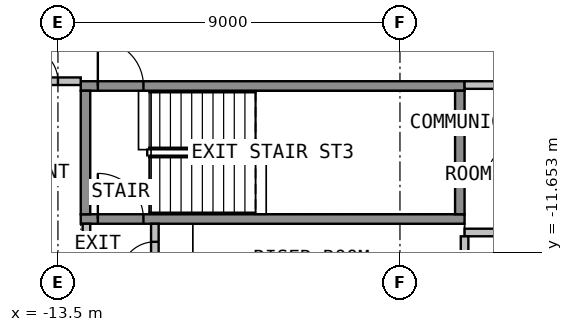
"""IFC4 building model, lengths in metres.
Left out: names, types, materials, properties, quantities, classifications, styles, units other than length and angle.
Written with IfcOpenShell. Run it as: python <this file> out.ifc"""

import sys

from ifc_helpers import new_model, si_unit, direction, frame, frame_2d, origin, place, context, subcontext, project, spatial, rectangle, extrude, element, fill, save


model = new_model("IFC4")
c1 = context("Model", 3, precision=1e-05, world=origin(), true_north=direction((0.0, 1.0)))
c2 = subcontext(c1, "Body", "Model", "MODEL_VIEW")
j1 = project(units=[si_unit("LENGTHUNIT", "METRE"), si_unit("PLANEANGLEUNIT", "RADIAN")], contexts=[c1])
p1 = place(None, origin())
s1 = spatial("IfcSite", under=j1, at=p1, CompositionType="ELEMENT")
p2 = place(p1, origin())
s2 = spatial("IfcBuilding", under=s1, at=p2, CompositionType="ELEMENT")
p3 = place(p2, frame((0.0, 0.0, 132.6)))
s3 = spatial("IfcBuildingStorey", under=s2, at=p3, CompositionType="ELEMENT", Elevation=132.6)
p4 = place(p3, frame((-12.9, -10.775, 0.0), z_axis=(0.0, 0.0, 1.0), x_axis=(1.0, 0.0, 0.0)))
e1 = element("IfcWall", 1, at=p4, inside=s3, PredefinedType="SHEAR", context=c2, shape_type="SweptSolid", body=[
    extrude(rectangle(XDim=10.1, YDim=0.25, at=frame_2d((5.05, 0.0))), origin(), (0.0, 0.0, 1.0), 3.575),
])
p5 = place(p4, frame((0.45, 0.0, 0.0)))
e2 = element("IfcOpeningElement", 2, at=p5, cuts=e1, PredefinedType="OPENING", context=c2, shape_type="SweptSolid", body=[
    extrude(rectangle(XDim=1.2, YDim=2.1, at=frame_2d((0.6, 1.05))), frame((0.0, 0.135, 0.0), z_axis=(0.0, -1.0, 0.0), x_axis=(1.0, 0.0, 0.0)), (0.0, 0.0, 1.0), 0.27),
])
p6 = place(p3, frame((-12.9, -7.275, 0.0), z_axis=(0.0, 0.0, 1.0), x_axis=(1.0, 0.0, 0.0)))
e3 = element("IfcWall", 3, at=p6, inside=s3, PredefinedType="SHEAR", context=c2, shape_type="SweptSolid", body=[
    extrude(rectangle(XDim=10.1, YDim=0.25, at=frame_2d((5.05, 0.0))), origin(), (0.0, 0.0, 1.0), 3.575),
])
p7 = place(p6, frame((0.45, 0.0, 0.0)))
e4 = element("IfcOpeningElement", 4, at=p7, cuts=e3, PredefinedType="OPENING", context=c2, shape_type="SweptSolid", body=[
    extrude(rectangle(XDim=1.2, YDim=2.1, at=frame_2d((0.6, 1.05))), frame((0.0, 0.135, 0.0), z_axis=(0.0, -1.0, 0.0), x_axis=(1.0, 0.0, 0.0)), (0.0, 0.0, 1.0), 0.27),
])
for number, where, z_axis, x_axis in (
    (5, (-12.775, -10.65, 0.0), (0.0, 0.0, 1.0), (0.0, 1.0, 0.0)),
    (6, (-2.925, -10.65, 0.0), (0.0, 0.0, 1.0), (0.0, 1.0, 0.0)),
):
    element("IfcWall", number, at=place(p3, frame(where, z_axis=z_axis, x_axis=x_axis)), inside=s3, PredefinedType="SHEAR", context=c2, shape_type="SweptSolid", body=[
        extrude(rectangle(XDim=3.25, YDim=0.25, at=frame_2d((1.625, 0.0))), origin(), (0.0, 0.0, 1.0), 3.575),
    ])
for number, where, z_axis, x_axis in (
    (7, (-2.8, -7.25, 0.0), (0.0, 0.0, 1.0), (1.0, 0.0, 0.0)),
    (8, (-2.8, -11.13, 0.0), (0.0, 0.0, 1.0), (1.0, 0.0, 0.0)),
):
    element("IfcWall", number, at=place(p3, frame(where, z_axis=z_axis, x_axis=x_axis)), inside=s3, PredefinedType="PARTITIONING", context=c2, shape_type="SweptSolid", body=[
        extrude(rectangle(XDim=1.4, YDim=0.2, at=frame_2d((0.7, 0.0))), origin(), (0.0, 0.0, 1.0), 3.575),
    ])
p8 = place(p3, frame((-12.75, -12.75, 0.0), z_axis=(0.0, 0.0, 1.0), x_axis=(0.0, 1.0, 0.0)))
e9 = element("IfcWall", 9, at=p8, inside=s3, PredefinedType="PARTITIONING", context=c2, shape_type="SweptSolid", body=[
    extrude(rectangle(XDim=1.85, YDim=0.2, at=frame_2d((0.925, 0.0))), origin(), (0.0, 0.0, 1.0), 3.575),
])
p9 = place(p3, frame((-10.95, -12.75, 0.0), z_axis=(0.0, 0.0, 1.0), x_axis=(0.0, 1.0, 0.0)))
e10 = element("IfcWall", 10, at=p9, inside=s3, PredefinedType="PARTITIONING", context=c2, shape_type="SweptSolid", body=[
    extrude(rectangle(XDim=1.85, YDim=0.2, at=frame_2d((0.925, 0.0))), origin(), (0.0, 0.0, 1.0), 3.575),
])
p10 = place(p9, frame((0.475, 0.0, 0.0)))
e11 = element("IfcOpeningElement", 11, at=p10, cuts=e10, PredefinedType="OPENING", context=c2, shape_type="SweptSolid", body=[
    extrude(rectangle(XDim=0.9, YDim=2.1, at=frame_2d((0.45, 1.05))), frame((0.0, 0.11, 0.0), z_axis=(0.0, -1.0, 0.0), x_axis=(1.0, 0.0, 0.0)), (0.0, 0.0, 1.0), 0.22),
])
p11 = place(p3, frame((-15.0, -7.15, 0.0), z_axis=(0.0, 0.0, 1.0), x_axis=(1.0, 0.0, 0.0)))
e12 = element("IfcWall", 12, at=p11, inside=s3, PredefinedType="PARTITIONING", context=c2, shape_type="SweptSolid", body=[
    extrude(rectangle(XDim=2.1, YDim=0.2, at=frame_2d((1.05, 0.0))), origin(), (0.0, 0.0, 1.0), 3.575),
])
p12 = place(p11, frame((0.6, 0.0, 0.0)))
e13 = element("IfcOpeningElement", 13, at=p12, cuts=e12, PredefinedType="OPENING", context=c2, shape_type="SweptSolid", body=[
    extrude(rectangle(XDim=0.9, YDim=2.1, at=frame_2d((0.45, 1.05))), frame((0.0, 0.11, 0.0), z_axis=(0.0, -1.0, 0.0), x_axis=(1.0, 0.0, 0.0)), (0.0, 0.0, 1.0), 0.22),
])
p13 = place(p3, frame((-2.8, -12.749, 0.0), z_axis=(0.0, 0.0, 1.0), x_axis=(0.0, 1.0, 0.0)))
e14 = element("IfcWall", 14, at=p13, inside=s3, PredefinedType="PARTITIONING", context=c2, shape_type="SweptSolid", body=[
    extrude(rectangle(XDim=1.518, YDim=0.2, at=frame_2d((0.759, 0.0))), origin(), (0.0, 0.0, 1.0), 3.575),
])
p14 = place(p7, origin())
e15 = element("IfcDoor", 15, at=p14, inside=s3, OperationType="SINGLE_SWING_LEFT", PredefinedType="DOOR", context=c2, shape_type="SweptSolid", body=[
    extrude(rectangle(XDim=1.2, YDim=2.1, at=frame_2d((0.6, 1.05))), frame((0.0, 0.025, 0.0), z_axis=(0.0, -1.0, 0.0), x_axis=(1.0, 0.0, 0.0)), (0.0, 0.0, 1.0), 0.05),
])
fill(e4, e15)
p15 = place(p5, origin())
e16 = element("IfcDoor", 16, at=p15, inside=s3, OperationType="SINGLE_SWING_RIGHT", PredefinedType="DOOR", context=c2, shape_type="SweptSolid", body=[
    extrude(rectangle(XDim=1.2, YDim=2.1, at=frame_2d((0.6, 1.05))), frame((0.0, 0.025, 0.0), z_axis=(0.0, -1.0, 0.0), x_axis=(1.0, 0.0, 0.0)), (0.0, 0.0, 1.0), 0.05),
])
fill(e2, e16)
p16 = place(p10, origin())
e17 = element("IfcDoor", 17, at=p16, inside=s3, OperationType="SINGLE_SWING_LEFT", PredefinedType="DOOR", context=c2, shape_type="SweptSolid", body=[
    extrude(rectangle(XDim=0.9, YDim=2.1, at=frame_2d((0.45, 1.05))), frame((0.0, 0.025, 0.0), z_axis=(0.0, -1.0, 0.0), x_axis=(1.0, 0.0, 0.0)), (0.0, 0.0, 1.0), 0.05),
])
fill(e11, e17)
p17 = place(p12, origin())
e18 = element("IfcDoor", 18, at=p17, inside=s3, OperationType="SINGLE_SWING_LEFT", PredefinedType="DOOR", context=c2, shape_type="SweptSolid", body=[
    extrude(rectangle(XDim=0.9, YDim=2.1, at=frame_2d((0.45, 1.05))), frame((0.0, 0.025, 0.0), z_axis=(0.0, -1.0, 0.0), x_axis=(1.0, 0.0, 0.0)), (0.0, 0.0, 1.0), 0.05),
])
fill(e13, e18)
save(model, sys.argv[1])
